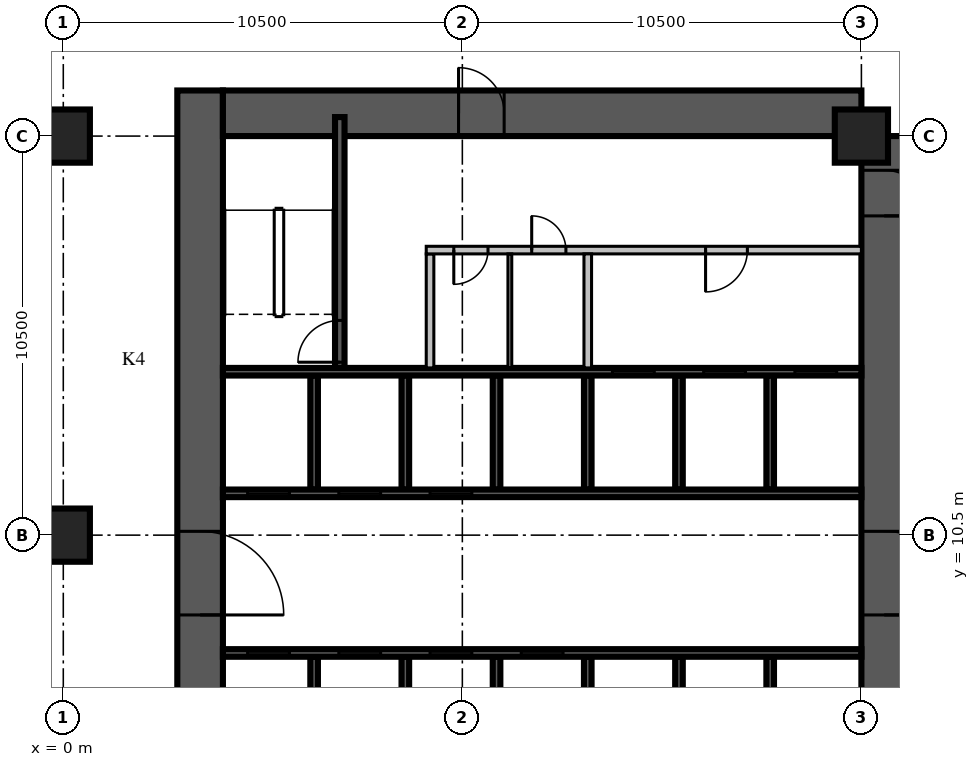
"""IFC4 building model, lengths in metres.
Left out: names, types, materials, properties, quantities, classifications, styles, units other than length and angle.
Written with IfcOpenShell. Run it as: python <this file> out.ifc"""

import sys

from ifc_helpers import new_model, si_unit, direction, frame, frame_2d, origin, origin_2d, place, context, subcontext, project, spatial, rectangle, extrude, source, transform, mapped, element, fill, save


model = new_model("IFC4")
c1 = context("Model", 3, precision=1e-05, world=origin(), true_north=direction((0.0, 1.0)))
c2 = subcontext(c1, "Body", "Model", "MODEL_VIEW")
j1 = project(units=[si_unit("LENGTHUNIT", "METRE"), si_unit("PLANEANGLEUNIT", "RADIAN")], contexts=[c1])
p1 = place(None, origin())
s1 = spatial("IfcSite", under=j1, at=p1, CompositionType="ELEMENT")
p2 = place(p1, origin())
s2 = spatial("IfcBuilding", under=s1, at=p2, CompositionType="ELEMENT")
p3 = place(p2, frame((0.0, 0.0, -4.5)))
s3 = spatial("IfcBuildingStorey", under=s2, at=p3, CompositionType="ELEMENT", Elevation=-4.5)
m1 = source(origin(), c2, "Body", "SweptSolid", [
    extrude(rectangle(XDim=1.4, YDim=1.4, at=origin_2d()), origin(), (0.0, 0.0, 1.0), 4.5),
])
for number, where, z_axis, x_axis in (
    (1, (0.0, 10.5, 0.0), (0.0, 0.0, 1.0), (1.0, 0.0, 0.0)),
    (2, (0.0, 21.0, 0.0), (0.0, 0.0, 1.0), (1.0, 0.0, 0.0)),
    (3, (21.0, 21.0, 0.0), (0.0, 0.0, 1.0), (1.0, 0.0, 0.0)),
):
    element("IfcColumn", number, at=place(p3, frame(where, z_axis=z_axis, x_axis=x_axis)), inside=s3, PredefinedType="COLUMN", context=c2, shape_type="MappedRepresentation", body=[
        mapped(m1, transform((0.0, 0.0, 0.0), scale=1.0)),
    ])
m2 = source(origin(), c2, "Body", "SweptSolid", [
    extrude(rectangle(XDim=18.0, YDim=1.2, at=frame_2d((9.0, 0.0))), origin(), (0.0, 0.0, 1.0), 4.5),
])
p4 = place(p3, frame((3.6, 4.2, 0.0), z_axis=(0.0, 0.0, 1.0), x_axis=(0.0, 1.0, 0.0)))
e4 = element("IfcWall", 4, at=p4, inside=s3, PredefinedType="SHEAR", context=c2, shape_type="MappedRepresentation", body=[
    mapped(m2, transform((0.0, 0.0, 0.0), scale=1.0)),
])
m3 = source(origin(), c2, "Body", "SweptSolid", [
    extrude(rectangle(XDim=2.2, YDim=2.1, at=frame_2d((1.1, 1.05))), frame((0.0, 0.61, 0.0), z_axis=(0.0, -1.0, 0.0), x_axis=(1.0, 0.0, 0.0)), (0.0, 0.0, 1.0), 1.22),
])
p5 = place(p4, frame((4.2, 0.0, 0.0)))
e5 = element("IfcOpeningElement", 5, at=p5, cuts=e4, PredefinedType="OPENING", context=c2, shape_type="MappedRepresentation", body=[
    mapped(m3, transform((0.0, 0.0, 0.0), scale=1.0)),
])
m4 = source(origin(), c2, "Body", "SweptSolid", [
    extrude(rectangle(XDim=16.8, YDim=1.2, at=frame_2d((8.4, 0.0))), origin(), (0.0, 0.0, 1.0), 4.5),
])
p6 = place(p3, frame((21.6, 4.2, 0.0), z_axis=(0.0, 0.0, 1.0), x_axis=(0.0, 1.0, 0.0)))
e6 = element("IfcWall", 6, at=p6, inside=s3, PredefinedType="SHEAR", context=c2, shape_type="MappedRepresentation", body=[
    mapped(m4, transform((0.0, 0.0, 0.0), scale=1.0)),
])
p7 = place(p6, frame((4.2, 0.0, 0.0)))
e7 = element("IfcOpeningElement", 7, at=p7, cuts=e6, PredefinedType="OPENING", context=c2, shape_type="MappedRepresentation", body=[
    mapped(m3, transform((0.0, 0.0, 0.0), scale=1.0)),
])
m5 = source(origin(), c2, "Body", "SweptSolid", [
    extrude(rectangle(XDim=1.2, YDim=2.1, at=frame_2d((0.6, 1.05))), frame((0.0, 0.61, 0.0), z_axis=(0.0, -1.0, 0.0), x_axis=(1.0, 0.0, 0.0)), (0.0, 0.0, 1.0), 1.22),
])
p8 = place(p6, frame((14.7, 0.0, 0.0)))
e8 = element("IfcOpeningElement", 8, at=p8, cuts=e6, PredefinedType="OPENING", context=c2, shape_type="MappedRepresentation", body=[
    mapped(m5, transform((0.0, 0.0, 0.0), scale=1.0)),
])
p9 = place(p3, frame((4.2, 21.6, 0.0), z_axis=(0.0, 0.0, 1.0), x_axis=(1.0, 0.0, 0.0)))
e9 = element("IfcWall", 9, at=p9, inside=s3, PredefinedType="SHEAR", context=c2, shape_type="MappedRepresentation", body=[
    mapped(m4, transform((0.0, 0.0, 0.0), scale=1.0)),
])
p10 = place(p9, frame((6.2, 0.0, 0.0)))
e10 = element("IfcOpeningElement", 10, at=p10, cuts=e9, PredefinedType="OPENING", context=c2, shape_type="MappedRepresentation", body=[
    mapped(m5, transform((0.0, 0.0, 0.0), scale=1.0)),
])
m6 = source(origin(), c2, "Body", "SweptSolid", [
    extrude(rectangle(XDim=3.1, YDim=0.2, at=frame_2d((1.55, 0.0))), origin(), (0.0, 0.0, 1.0), 4.5),
])
for number, where, z_axis, x_axis in (
    (11, (6.6, 4.2, 0.0), (0.0, 0.0, 1.0), (0.0, 1.0, 0.0)),
    (12, (9.0, 4.2, 0.0), (0.0, 0.0, 1.0), (0.0, 1.0, 0.0)),
    (13, (11.4, 4.2, 0.0), (0.0, 0.0, 1.0), (0.0, 1.0, 0.0)),
    (14, (13.8, 4.2, 0.0), (0.0, 0.0, 1.0), (0.0, 1.0, 0.0)),
    (15, (16.2, 4.2, 0.0), (0.0, 0.0, 1.0), (0.0, 1.0, 0.0)),
    (16, (18.6, 4.2, 0.0), (0.0, 0.0, 1.0), (0.0, 1.0, 0.0)),
):
    element("IfcWall", number, at=place(p3, frame(where, z_axis=z_axis, x_axis=x_axis)), inside=s3, PredefinedType="SOLIDWALL", context=c2, shape_type="MappedRepresentation", body=[
        mapped(m6, transform((0.0, 0.0, 0.0), scale=1.0)),
    ])
m7 = source(origin(), c2, "Body", "SweptSolid", [
    extrude(rectangle(XDim=3.0, YDim=0.2, at=frame_2d((1.5, 0.0))), origin(), (0.0, 0.0, 1.0), 4.5),
])
for number, where, z_axis, x_axis in (
    (17, (6.6, 11.7, 0.0), (0.0, 0.0, 1.0), (0.0, 1.0, 0.0)),
    (18, (9.0, 11.7, 0.0), (0.0, 0.0, 1.0), (0.0, 1.0, 0.0)),
    (19, (11.4, 11.7, 0.0), (0.0, 0.0, 1.0), (0.0, 1.0, 0.0)),
    (20, (13.8, 11.7, 0.0), (0.0, 0.0, 1.0), (0.0, 1.0, 0.0)),
    (21, (16.2, 11.7, 0.0), (0.0, 0.0, 1.0), (0.0, 1.0, 0.0)),
    (22, (18.6, 11.7, 0.0), (0.0, 0.0, 1.0), (0.0, 1.0, 0.0)),
):
    element("IfcWall", number, at=place(p3, frame(where, z_axis=z_axis, x_axis=x_axis)), inside=s3, PredefinedType="SOLIDWALL", context=c2, shape_type="MappedRepresentation", body=[
        mapped(m7, transform((0.0, 0.0, 0.0), scale=1.0)),
    ])
m8 = source(origin(), c2, "Body", "SweptSolid", [
    extrude(rectangle(XDim=16.8, YDim=0.2, at=frame_2d((8.4, 0.0))), origin(), (0.0, 0.0, 1.0), 4.5),
])
p11 = place(p3, frame((4.2, 7.4, 0.0), z_axis=(0.0, 0.0, 1.0), x_axis=(1.0, 0.0, 0.0)))
e23 = element("IfcWall", 23, at=p11, inside=s3, PredefinedType="SOLIDWALL", context=c2, shape_type="MappedRepresentation", body=[
    mapped(m8, transform((0.0, 0.0, 0.0), scale=1.0)),
])
m9 = source(origin(), c2, "Body", "SweptSolid", [
    extrude(rectangle(XDim=1.1, YDim=2.1, at=frame_2d((0.55, 1.05))), frame((0.0, 0.11, 0.0), z_axis=(0.0, -1.0, 0.0), x_axis=(1.0, 0.0, 0.0)), (0.0, 0.0, 1.0), 0.22),
])
p12 = place(p11, frame((0.65, 0.0, 0.0)))
e24 = element("IfcOpeningElement", 24, at=p12, cuts=e23, PredefinedType="OPENING", context=c2, shape_type="MappedRepresentation", body=[
    mapped(m9, transform((0.0, 0.0, 0.0), scale=1.0)),
])
p13 = place(p11, frame((3.05, 0.0, 0.0)))
e25 = element("IfcOpeningElement", 25, at=p13, cuts=e23, PredefinedType="OPENING", context=c2, shape_type="MappedRepresentation", body=[
    mapped(m9, transform((0.0, 0.0, 0.0), scale=1.0)),
])
p14 = place(p11, frame((5.45, 0.0, 0.0)))
e26 = element("IfcOpeningElement", 26, at=p14, cuts=e23, PredefinedType="OPENING", context=c2, shape_type="MappedRepresentation", body=[
    mapped(m9, transform((0.0, 0.0, 0.0), scale=1.0)),
])
p15 = place(p11, frame((7.85, 0.0, 0.0)))
e27 = element("IfcOpeningElement", 27, at=p15, cuts=e23, PredefinedType="OPENING", context=c2, shape_type="MappedRepresentation", body=[
    mapped(m9, transform((0.0, 0.0, 0.0), scale=1.0)),
])
p16 = place(p3, frame((4.2, 11.6, 0.0), z_axis=(0.0, 0.0, 1.0), x_axis=(1.0, 0.0, 0.0)))
e28 = element("IfcWall", 28, at=p16, inside=s3, PredefinedType="SOLIDWALL", context=c2, shape_type="MappedRepresentation", body=[
    mapped(m8, transform((0.0, 0.0, 0.0), scale=1.0)),
])
p17 = place(p16, frame((0.65, 0.0, 0.0)))
e29 = element("IfcOpeningElement", 29, at=p17, cuts=e28, PredefinedType="OPENING", context=c2, shape_type="MappedRepresentation", body=[
    mapped(m9, transform((0.0, 0.0, 0.0), scale=1.0)),
])
p18 = place(p16, frame((3.05, 0.0, 0.0)))
e30 = element("IfcOpeningElement", 30, at=p18, cuts=e28, PredefinedType="OPENING", context=c2, shape_type="MappedRepresentation", body=[
    mapped(m9, transform((0.0, 0.0, 0.0), scale=1.0)),
])
p19 = place(p16, frame((5.45, 0.0, 0.0)))
e31 = element("IfcOpeningElement", 31, at=p19, cuts=e28, PredefinedType="OPENING", context=c2, shape_type="MappedRepresentation", body=[
    mapped(m9, transform((0.0, 0.0, 0.0), scale=1.0)),
])
p20 = place(p3, frame((4.2, 14.8, 0.0), z_axis=(0.0, 0.0, 1.0), x_axis=(1.0, 0.0, 0.0)))
e32 = element("IfcWall", 32, at=p20, inside=s3, PredefinedType="SOLIDWALL", context=c2, shape_type="MappedRepresentation", body=[
    mapped(m8, transform((0.0, 0.0, 0.0), scale=1.0)),
])
p21 = place(p20, frame((10.25, 0.0, 0.0)))
e33 = element("IfcOpeningElement", 33, at=p21, cuts=e32, PredefinedType="OPENING", context=c2, shape_type="MappedRepresentation", body=[
    mapped(m9, transform((0.0, 0.0, 0.0), scale=1.0)),
])
p22 = place(p20, frame((12.65, 0.0, 0.0)))
e34 = element("IfcOpeningElement", 34, at=p22, cuts=e32, PredefinedType="OPENING", context=c2, shape_type="MappedRepresentation", body=[
    mapped(m9, transform((0.0, 0.0, 0.0), scale=1.0)),
])
p23 = place(p20, frame((15.05, 0.0, 0.0)))
e35 = element("IfcOpeningElement", 35, at=p23, cuts=e32, PredefinedType="OPENING", context=c2, shape_type="MappedRepresentation", body=[
    mapped(m9, transform((0.0, 0.0, 0.0), scale=1.0)),
])
m10 = source(origin(), c2, "Body", "SweptSolid", [
    extrude(rectangle(XDim=6.6, YDim=0.25, at=frame_2d((3.3, 0.0))), origin(), (0.0, 0.0, 1.0), 3.9),
])
p24 = place(p3, frame((7.275, 14.9, 0.0), z_axis=(0.0, 0.0, 1.0), x_axis=(0.0, 1.0, 0.0)))
e36 = element("IfcWall", 36, at=p24, inside=s3, PredefinedType="SOLIDWALL", context=c2, shape_type="MappedRepresentation", body=[
    mapped(m10, transform((0.0, 0.0, 0.0), scale=1.0)),
])
m11 = source(origin(), c2, "Body", "SweptSolid", [
    extrude(rectangle(XDim=1.1, YDim=2.1, at=frame_2d((0.55, 1.05))), frame((0.0, 0.135, 0.0), z_axis=(0.0, -1.0, 0.0), x_axis=(1.0, 0.0, 0.0)), (0.0, 0.0, 1.0), 0.27),
])
p25 = place(p24, frame((0.15, 0.0, 0.0)))
e37 = element("IfcOpeningElement", 37, at=p25, cuts=e36, PredefinedType="OPENING", context=c2, shape_type="MappedRepresentation", body=[
    mapped(m11, transform((0.0, 0.0, 0.0), scale=1.0)),
])
m12 = source(origin(), c2, "Body", "SweptSolid", [
    extrude(rectangle(XDim=3.0, YDim=0.2, at=frame_2d((1.5, 0.0))), origin(), (0.0, 0.0, 1.0), 3.9),
])
p26 = place(p3, frame((9.65, 14.9, 0.0), z_axis=(0.0, 0.0, 1.0), x_axis=(0.0, 1.0, 0.0)))
e38 = element("IfcWall", 38, at=p26, inside=s3, PredefinedType="PARTITIONING", context=c2, shape_type="MappedRepresentation", body=[
    mapped(m12, transform((0.0, 0.0, 0.0), scale=1.0)),
])
m13 = source(origin(), c2, "Body", "SweptSolid", [
    extrude(rectangle(XDim=11.45, YDim=0.2, at=frame_2d((5.725, 0.0))), origin(), (0.0, 0.0, 1.0), 3.9),
])
p27 = place(p3, frame((9.55, 18.0, 0.0), z_axis=(0.0, 0.0, 1.0), x_axis=(1.0, 0.0, 0.0)))
e39 = element("IfcWall", 39, at=p27, inside=s3, PredefinedType="PARTITIONING", context=c2, shape_type="MappedRepresentation", body=[
    mapped(m13, transform((0.0, 0.0, 0.0), scale=1.0)),
])
m14 = source(origin(), c2, "Body", "SweptSolid", [
    extrude(rectangle(XDim=0.9, YDim=2.1, at=frame_2d((0.45, 1.05))), frame((0.0, 0.11, 0.0), z_axis=(0.0, -1.0, 0.0), x_axis=(1.0, 0.0, 0.0)), (0.0, 0.0, 1.0), 0.22),
])
p28 = place(p27, frame((0.725, 0.0, 0.0)))
e40 = element("IfcOpeningElement", 40, at=p28, cuts=e39, PredefinedType="OPENING", context=c2, shape_type="MappedRepresentation", body=[
    mapped(m14, transform((0.0, 0.0, 0.0), scale=1.0)),
])
p29 = place(p27, frame((2.775, 0.0, 0.0)))
e41 = element("IfcOpeningElement", 41, at=p29, cuts=e39, PredefinedType="OPENING", context=c2, shape_type="MappedRepresentation", body=[
    mapped(m14, transform((0.0, 0.0, 0.0), scale=1.0)),
])
p30 = place(p27, frame((7.35, 0.0, 0.0)))
e42 = element("IfcOpeningElement", 42, at=p30, cuts=e39, PredefinedType="OPENING", context=c2, shape_type="MappedRepresentation", body=[
    mapped(m9, transform((0.0, 0.0, 0.0), scale=1.0)),
])
p31 = place(p3, frame((13.8, 14.9, 0.0), z_axis=(0.0, 0.0, 1.0), x_axis=(0.0, 1.0, 0.0)))
e43 = element("IfcWall", 43, at=p31, inside=s3, PredefinedType="PARTITIONING", context=c2, shape_type="MappedRepresentation", body=[
    mapped(m12, transform((0.0, 0.0, 0.0), scale=1.0)),
])
m15 = source(origin(), c2, "Body", "SweptSolid", [
    extrude(rectangle(XDim=3.0, YDim=0.1, at=frame_2d((1.5, 0.0))), origin(), (0.0, 0.0, 1.0), 3.9),
])
p32 = place(p3, frame((11.75, 14.9, 0.0), z_axis=(0.0, 0.0, 1.0), x_axis=(0.0, 1.0, 0.0)))
e44 = element("IfcWall", 44, at=p32, inside=s3, PredefinedType="PARTITIONING", context=c2, shape_type="MappedRepresentation", body=[
    mapped(m15, transform((0.0, 0.0, 0.0), scale=1.0)),
])
m16 = source(origin(), c2, "Body", "SweptSolid", [
    extrude(rectangle(XDim=1.1, YDim=2.1, at=frame_2d((0.55, 1.05))), frame((0.0, 0.025, 0.0), z_axis=(0.0, -1.0, 0.0), x_axis=(1.0, 0.0, 0.0)), (0.0, 0.0, 1.0), 0.05),
])
p33 = place(p12, origin())
e45 = element("IfcDoor", 45, at=p33, inside=s3, OperationType="SLIDING_TO_LEFT", PredefinedType="DOOR", context=c2, shape_type="MappedRepresentation", body=[
    mapped(m16, transform((0.0, 0.0, 0.0), scale=1.0)),
])
fill(e24, e45)
p34 = place(p13, origin())
e46 = element("IfcDoor", 46, at=p34, inside=s3, OperationType="SLIDING_TO_LEFT", PredefinedType="DOOR", context=c2, shape_type="MappedRepresentation", body=[
    mapped(m16, transform((0.0, 0.0, 0.0), scale=1.0)),
])
fill(e25, e46)
p35 = place(p14, origin())
e47 = element("IfcDoor", 47, at=p35, inside=s3, OperationType="SLIDING_TO_LEFT", PredefinedType="DOOR", context=c2, shape_type="MappedRepresentation", body=[
    mapped(m16, transform((0.0, 0.0, 0.0), scale=1.0)),
])
fill(e26, e47)
p36 = place(p15, origin())
e48 = element("IfcDoor", 48, at=p36, inside=s3, OperationType="SLIDING_TO_LEFT", PredefinedType="DOOR", context=c2, shape_type="MappedRepresentation", body=[
    mapped(m16, transform((0.0, 0.0, 0.0), scale=1.0)),
])
fill(e27, e48)
p37 = place(p17, origin())
e49 = element("IfcDoor", 49, at=p37, inside=s3, OperationType="SLIDING_TO_LEFT", PredefinedType="DOOR", context=c2, shape_type="MappedRepresentation", body=[
    mapped(m16, transform((0.0, 0.0, 0.0), scale=1.0)),
])
fill(e29, e49)
p38 = place(p18, origin())
e50 = element("IfcDoor", 50, at=p38, inside=s3, OperationType="SLIDING_TO_LEFT", PredefinedType="DOOR", context=c2, shape_type="MappedRepresentation", body=[
    mapped(m16, transform((0.0, 0.0, 0.0), scale=1.0)),
])
fill(e30, e50)
p39 = place(p19, origin())
e51 = element("IfcDoor", 51, at=p39, inside=s3, OperationType="SLIDING_TO_LEFT", PredefinedType="DOOR", context=c2, shape_type="MappedRepresentation", body=[
    mapped(m16, transform((0.0, 0.0, 0.0), scale=1.0)),
])
fill(e31, e51)
p40 = place(p21, origin())
e52 = element("IfcDoor", 52, at=p40, inside=s3, OperationType="SLIDING_TO_LEFT", PredefinedType="DOOR", context=c2, shape_type="MappedRepresentation", body=[
    mapped(m16, transform((0.0, 0.0, 0.0), scale=1.0)),
])
fill(e33, e52)
p41 = place(p22, origin())
e53 = element("IfcDoor", 53, at=p41, inside=s3, OperationType="SLIDING_TO_LEFT", PredefinedType="DOOR", context=c2, shape_type="MappedRepresentation", body=[
    mapped(m16, transform((0.0, 0.0, 0.0), scale=1.0)),
])
fill(e34, e53)
p42 = place(p23, origin())
e54 = element("IfcDoor", 54, at=p42, inside=s3, OperationType="SLIDING_TO_LEFT", PredefinedType="DOOR", context=c2, shape_type="MappedRepresentation", body=[
    mapped(m16, transform((0.0, 0.0, 0.0), scale=1.0)),
])
fill(e35, e54)
p43 = place(p25, origin())
e55 = element("IfcDoor", 55, at=p43, inside=s3, OperationType="SINGLE_SWING_LEFT", PredefinedType="DOOR", context=c2, shape_type="MappedRepresentation", body=[
    mapped(m16, transform((0.0, 0.0, 0.0), scale=1.0)),
])
fill(e37, e55)
m17 = source(origin(), c2, "Body", "SweptSolid", [
    extrude(rectangle(XDim=0.9, YDim=2.1, at=frame_2d((0.45, 1.05))), frame((0.0, 0.025, 0.0), z_axis=(0.0, -1.0, 0.0), x_axis=(1.0, 0.0, 0.0)), (0.0, 0.0, 1.0), 0.05),
])
p44 = place(p28, origin())
e56 = element("IfcDoor", 56, at=p44, inside=s3, OperationType="SINGLE_SWING_RIGHT", PredefinedType="DOOR", context=c2, shape_type="MappedRepresentation", body=[
    mapped(m17, transform((0.0, 0.0, 0.0), scale=1.0)),
])
fill(e40, e56)
p45 = place(p29, origin())
e57 = element("IfcDoor", 57, at=p45, inside=s3, OperationType="SINGLE_SWING_LEFT", PredefinedType="DOOR", context=c2, shape_type="MappedRepresentation", body=[
    mapped(m17, transform((0.0, 0.0, 0.0), scale=1.0)),
])
fill(e41, e57)
p46 = place(p30, origin())
e58 = element("IfcDoor", 58, at=p46, inside=s3, OperationType="SINGLE_SWING_RIGHT", PredefinedType="DOOR", context=c2, shape_type="MappedRepresentation", body=[
    mapped(m16, transform((0.0, 0.0, 0.0), scale=1.0)),
])
fill(e42, e58)
m18 = source(origin(), c2, "Body", "SweptSolid", [
    extrude(rectangle(XDim=2.2, YDim=2.1, at=frame_2d((1.1, 1.05))), frame((0.0, 0.025, 0.0), z_axis=(0.0, -1.0, 0.0), x_axis=(1.0, 0.0, 0.0)), (0.0, 0.0, 1.0), 0.05),
])
p47 = place(p7, origin())
e59 = element("IfcDoor", 59, at=p47, inside=s3, OperationType="DOUBLE_DOOR_SINGLE_SWING", PredefinedType="DOOR", context=c2, shape_type="MappedRepresentation", body=[
    mapped(m18, transform((0.0, 0.0, 0.0), scale=1.0)),
])
fill(e7, e59)
p48 = place(p5, origin())
e60 = element("IfcDoor", 60, at=p48, inside=s3, OperationType="DOUBLE_DOOR_SINGLE_SWING", PredefinedType="DOOR", context=c2, shape_type="MappedRepresentation", body=[
    mapped(m18, transform((0.0, 0.0, 0.0), scale=1.0)),
])
fill(e5, e60)
m19 = source(origin(), c2, "Body", "SweptSolid", [
    extrude(rectangle(XDim=1.2, YDim=2.1, at=frame_2d((0.6, 1.05))), frame((0.0, 0.025, 0.0), z_axis=(0.0, -1.0, 0.0), x_axis=(1.0, 0.0, 0.0)), (0.0, 0.0, 1.0), 0.05),
])
p49 = place(p10, origin())
e61 = element("IfcDoor", 61, at=p49, inside=s3, OperationType="SINGLE_SWING_LEFT", PredefinedType="DOOR", context=c2, shape_type="MappedRepresentation", body=[
    mapped(m19, transform((0.0, 0.0, 0.0), scale=1.0)),
])
fill(e10, e61)
p50 = place(p8, origin())
e62 = element("IfcDoor", 62, at=p50, inside=s3, OperationType="SINGLE_SWING_RIGHT", PredefinedType="DOOR", context=c2, shape_type="MappedRepresentation", body=[
    mapped(m19, transform((0.0, 0.0, 0.0), scale=1.0)),
])
fill(e8, e62)
save(model, sys.argv[1])
